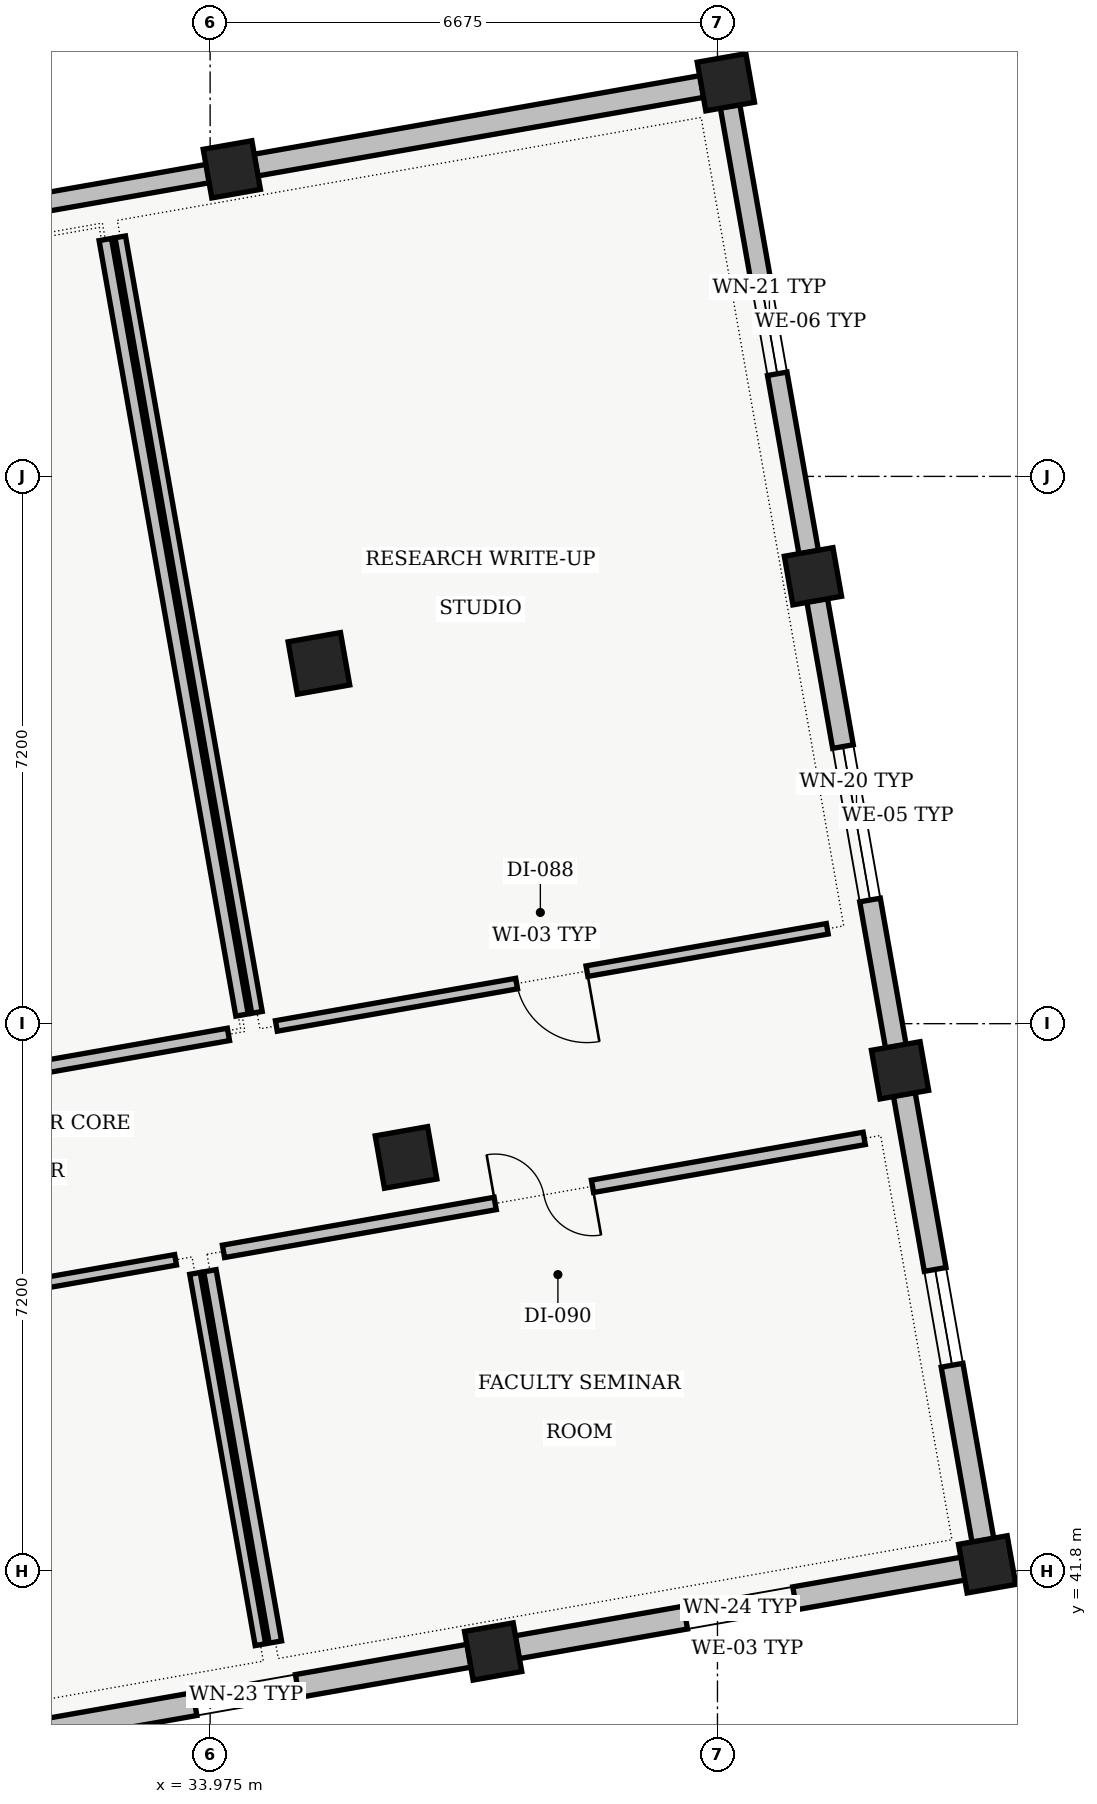
"""IFC4 building model, lengths in metres.
Left out: names, types, materials, properties, quantities, classifications, styles, units other than length and angle.
Written with IfcOpenShell. Run it as: python <this file> out.ifc"""

import sys

from ifc_helpers import new_model, si_unit, direction, frame, frame_2d, origin, origin_2d, place, context, subcontext, project, spatial, rectangle, extrude, element, fill, save


model = new_model("IFC4")
c1 = context("Model", 3, precision=1e-05, world=origin(), true_north=direction((0.0, 1.0)))
c2 = subcontext(c1, "Body", "Model", "MODEL_VIEW")
j1 = project(units=[si_unit("LENGTHUNIT", "METRE"), si_unit("PLANEANGLEUNIT", "RADIAN")], contexts=[c1])
p1 = place(None, origin())
s1 = spatial("IfcSite", under=j1, at=p1, CompositionType="ELEMENT")
p2 = place(p1, origin())
s2 = spatial("IfcBuilding", under=s1, at=p2, CompositionType="ELEMENT")
p3 = place(p2, frame((0.0, 0.0, 9.6)))
s3 = spatial("IfcBuildingStorey", under=s2, at=p3, CompositionType="ELEMENT", Elevation=9.6)
p4 = place(p3, frame((37.699, 40.74, 0.0), z_axis=(0.0, 0.0, 1.0), x_axis=(0.984807753012, 0.173648177667, 0.0)))
e1 = element("IfcColumn", 1, at=p4, inside=s3, PredefinedType="COLUMN", context=c2, shape_type="SweptSolid", body=[
    extrude(rectangle(XDim=0.65, YDim=0.65, at=origin_2d()), origin(), (0.0, 0.0, 1.0), 4.32),
])
for number, where, z_axis, x_axis in (
    (2, (36.552, 47.24, 0.0), (0.0, 0.0, 1.0), (0.985, 0.174, 0.0)),
    (3, (35.406, 53.74, 0.0), (0.0, 0.0, 1.0), (0.985, 0.174, 0.0)),
):
    element("IfcColumn", number, at=place(p3, frame(where, z_axis=z_axis, x_axis=x_axis)), inside=s3, PredefinedType="COLUMN", context=c2, shape_type="SweptSolid", body=[
        extrude(rectangle(XDim=0.7, YDim=0.7, at=origin_2d()), origin(), (0.0, 0.0, 1.0), 4.32),
    ])
for number, where, z_axis, x_axis in (
    (4, (34.26, 60.24, 0.0), (0.0, 0.0, 1.0), (0.985, 0.174, 0.0)),
    (5, (44.198, 41.886, 0.0), (0.0, 0.0, 1.0), (0.985, 0.174, 0.0)),
    (6, (43.052, 48.386, 0.0), (0.0, 0.0, 1.0), (0.985, 0.174, 0.0)),
    (7, (41.906, 54.886, 0.0), (0.0, 0.0, 1.0), (0.985, 0.174, 0.0)),
    (8, (40.76, 61.386, 0.0), (0.0, 0.0, 1.0), (0.985, 0.174, 0.0)),
):
    element("IfcColumn", number, at=place(p3, frame(where, z_axis=z_axis, x_axis=x_axis)), inside=s3, PredefinedType="COLUMN", context=c2, shape_type="SweptSolid", body=[
        extrude(rectangle(XDim=0.65, YDim=0.65, at=origin_2d()), origin(), (0.0, 0.0, 1.0), 4.32),
    ])
p5 = place(p3, frame((28.076, 59.149, 0.0), z_axis=(0.0, 0.0, 1.0), x_axis=(0.98480829201, 0.173645120828, 0.0)))
e9 = element("IfcWall", 9, at=p5, inside=s3, PredefinedType="STANDARD", context=c2, shape_type="SweptSolid", body=[
    extrude(rectangle(XDim=5.96, YDim=0.245, at=frame_2d((2.98, 0.0))), origin(), (0.0, 0.0, 1.0), 3.855),
])
p6 = place(p5, frame((2.34, 0.0, 0.95)))
e10 = element("IfcOpeningElement", 10, at=p6, cuts=e9, PredefinedType="OPENING", context=c2, shape_type="SweptSolid", body=[
    extrude(rectangle(XDim=1.28, YDim=1.4, at=frame_2d((0.64, 0.7))), frame((0.0, 0.123, 0.0), z_axis=(0.0, -1.0, 0.0), x_axis=(1.0, 0.0, 0.0)), (0.0, 0.0, 1.0), 0.245),
])
p7 = place(p3, frame((34.575, 60.295, 0.0), z_axis=(0.0, 0.0, 1.0), x_axis=(0.984809527099, 0.173638116021, 0.0)))
e11 = element("IfcWall", 11, at=p7, inside=s3, PredefinedType="STANDARD", context=c2, shape_type="SweptSolid", body=[
    extrude(rectangle(XDim=5.96, YDim=0.29, at=frame_2d((2.98, 0.0))), origin(), (0.0, 0.0, 1.0), 3.855),
])
p8 = place(p3, frame((40.816, 61.071, 0.0), z_axis=(0.0, 0.0, 1.0), x_axis=(0.173645120828, -0.98480829201, 0.0)))
e12 = element("IfcWall", 12, at=p8, inside=s3, PredefinedType="STANDARD", context=c2, shape_type="SweptSolid", body=[
    extrude(rectangle(XDim=5.96, YDim=0.26, at=frame_2d((2.98, 0.0))), origin(), (0.0, 0.0, 1.0), 3.855),
])
p9 = place(p8, frame((2.385, 0.0, 0.95)))
e13 = element("IfcOpeningElement", 13, at=p9, cuts=e12, PredefinedType="OPENING", context=c2, shape_type="SweptSolid", body=[
    extrude(rectangle(XDim=1.19, YDim=1.38, at=frame_2d((0.595, 0.69))), frame((0.0, 0.13, 0.0), z_axis=(0.0, -1.0, 0.0), x_axis=(1.0, 0.0, 0.0)), (0.0, 0.0, 1.0), 0.26),
])
p10 = place(p3, frame((41.962, 54.571, 0.0), z_axis=(0.0, 0.0, 1.0), x_axis=(0.173645120828, -0.98480829201, 0.0)))
e14 = element("IfcWall", 14, at=p10, inside=s3, PredefinedType="STANDARD", context=c2, shape_type="SweptSolid", body=[
    extrude(rectangle(XDim=5.96, YDim=0.275, at=frame_2d((2.98, 0.0))), origin(), (0.0, 0.0, 1.0), 3.855),
])
p11 = place(p10, frame((1.955, 0.0, 0.95)))
e15 = element("IfcOpeningElement", 15, at=p11, cuts=e14, PredefinedType="OPENING", context=c2, shape_type="SweptSolid", body=[
    extrude(rectangle(XDim=2.05, YDim=1.7, at=frame_2d((1.025, 0.85))), frame((0.0, 0.137, 0.0), z_axis=(0.0, -1.0, 0.0), x_axis=(1.0, 0.0, 0.0)), (0.0, 0.0, 1.0), 0.275),
])
p12 = place(p3, frame((43.108, 48.071, 0.0), z_axis=(0.0, 0.0, 1.0), x_axis=(0.173645120828, -0.98480829201, 0.0)))
e16 = element("IfcWall", 16, at=p12, inside=s3, PredefinedType="STANDARD", context=c2, shape_type="SweptSolid", body=[
    extrude(rectangle(XDim=5.96, YDim=0.29, at=frame_2d((2.98, 0.0))), origin(), (0.0, 0.0, 1.0), 3.855),
])
p13 = place(p12, frame((2.34, 0.0, 0.95)))
e17 = element("IfcOpeningElement", 17, at=p13, cuts=e16, PredefinedType="OPENING", context=c2, shape_type="SweptSolid", body=[
    extrude(rectangle(XDim=1.28, YDim=1.42, at=frame_2d((0.64, 0.71))), frame((0.0, 0.145, 0.0), z_axis=(0.0, -1.0, 0.0), x_axis=(1.0, 0.0, 0.0)), (0.0, 0.0, 1.0), 0.29),
])
p14 = place(p3, frame((43.883, 41.831, 0.0), z_axis=(0.0, 0.0, 1.0), x_axis=(-0.98480829201, -0.173645120828, 0.0)))
e18 = element("IfcWall", 18, at=p14, inside=s3, PredefinedType="STANDARD", context=c2, shape_type="SweptSolid", body=[
    extrude(rectangle(XDim=5.96, YDim=0.305, at=frame_2d((2.98, 0.0))), origin(), (0.0, 0.0, 1.0), 3.855),
])
p15 = place(p14, frame((2.25, 0.0, 0.95)))
e19 = element("IfcOpeningElement", 19, at=p15, cuts=e18, PredefinedType="OPENING", context=c2, shape_type="SweptSolid", body=[
    extrude(rectangle(XDim=1.46, YDim=1.44, at=frame_2d((0.73, 0.72))), frame((0.0, 0.152, 0.0), z_axis=(0.0, -1.0, 0.0), x_axis=(1.0, 0.0, 0.0)), (0.0, 0.0, 1.0), 0.305),
])
p16 = place(p3, frame((37.384, 40.685, 0.0), z_axis=(0.0, 0.0, 1.0), x_axis=(-0.98480829201, -0.173645120828, 0.0)))
e20 = element("IfcWall", 20, at=p16, inside=s3, PredefinedType="STANDARD", context=c2, shape_type="SweptSolid", body=[
    extrude(rectangle(XDim=5.96, YDim=0.305, at=frame_2d((2.98, 0.0))), origin(), (0.0, 0.0, 1.0), 3.855),
])
p17 = place(p16, frame((2.295, 0.0, 0.95)))
e21 = element("IfcOpeningElement", 21, at=p17, cuts=e20, PredefinedType="OPENING", context=c2, shape_type="SweptSolid", body=[
    extrude(rectangle(XDim=1.37, YDim=1.42, at=frame_2d((0.685, 0.71))), frame((0.0, 0.152, 0.0), z_axis=(0.0, -1.0, 0.0), x_axis=(1.0, 0.0, 0.0)), (0.0, 0.0, 1.0), 0.305),
])
p18 = place(p3, frame((20.665, 46.469, 0.0), z_axis=(0.0, 0.0, 1.0), x_axis=(0.984807841198, 0.173647677539, 0.0)))
e22 = element("IfcWall", 22, at=p18, inside=s3, PredefinedType="PARTITIONING", context=c2, shape_type="SweptSolid", body=[
    extrude(rectangle(XDim=13.76, YDim=0.165, at=frame_2d((6.88, 0.0))), origin(), (0.0, 0.0, 1.0), 3.855),
])
p19 = place(p18, frame((6.215, 0.0, 0.0)))
e23 = element("IfcOpeningElement", 23, at=p19, cuts=e22, PredefinedType="OPENING", context=c2, shape_type="SweptSolid", body=[
    extrude(rectangle(XDim=1.33, YDim=2.12, at=frame_2d((0.665, 1.06))), frame((0.0, 0.083, 0.0), z_axis=(0.0, -1.0, 0.0), x_axis=(1.0, 0.0, 0.0)), (0.0, 0.0, 1.0), 0.165),
])
p20 = place(p3, frame((34.395, 49.114, 0.0), z_axis=(0.0, 0.0, 1.0), x_axis=(-0.173654930775, 0.984806562233, 0.0)))
e24 = element("IfcWall", 24, at=p20, inside=s3, PredefinedType="PARTITIONING", context=c2, shape_type="SweptSolid", body=[
    extrude(rectangle(XDim=10.36, YDim=0.165, at=frame_2d((5.18, 0.0))), origin(), (0.0, 0.0, 1.0), 3.95),
])
p21 = place(p3, frame((34.846, 48.97, 0.0), z_axis=(0.0, 0.0, 1.0), x_axis=(0.984813264726, 0.173616916285, 0.0)))
e25 = element("IfcWall", 25, at=p21, inside=s3, PredefinedType="PARTITIONING", context=c2, shape_type="SweptSolid", body=[
    extrude(rectangle(XDim=7.36, YDim=0.14, at=frame_2d((3.68, 0.0))), origin(), (0.0, 0.0, 1.0), 3.855),
])
p22 = place(p21, frame((3.21, 0.0, 0.0)))
e26 = element("IfcOpeningElement", 26, at=p22, cuts=e25, PredefinedType="OPENING", context=c2, shape_type="SweptSolid", body=[
    extrude(rectangle(XDim=0.94, YDim=2.12, at=frame_2d((0.47, 1.06))), frame((0.0, 0.07, 0.0), z_axis=(0.0, -1.0, 0.0), x_axis=(1.0, 0.0, 0.0)), (0.0, 0.0, 1.0), 0.14),
])
p23 = place(p3, frame((32.792, 59.351, 0.0), z_axis=(0.0, 0.0, 1.0), x_axis=(0.173632075677, -0.984810592092, 0.0)))
e27 = element("IfcWall", 27, at=p23, inside=s3, PredefinedType="PARTITIONING", context=c2, shape_type="SweptSolid", body=[
    extrude(rectangle(XDim=10.36, YDim=0.14, at=frame_2d((5.18, 0.0))), origin(), (0.0, 0.0, 1.0), 3.95),
])
p24 = place(p3, frame((34.636, 40.83, 0.0), z_axis=(0.0, 0.0, 1.0), x_axis=(-0.173611232021, 0.984814266812, 0.0)))
e28 = element("IfcWall", 28, at=p24, inside=s3, PredefinedType="PARTITIONING", context=c2, shape_type="SweptSolid", body=[
    extrude(rectangle(XDim=4.96, YDim=0.14, at=frame_2d((2.48, 0.0))), origin(), (0.0, 0.0, 1.0), 3.95),
])
p25 = place(p3, frame((33.521, 45.893, 0.0), z_axis=(0.0, 0.0, 1.0), x_axis=(-0.984809322237, -0.173639277917, 0.0)))
e29 = element("IfcWall", 29, at=p25, inside=s3, PredefinedType="PARTITIONING", context=c2, shape_type="SweptSolid", body=[
    extrude(rectangle(XDim=8.01, YDim=0.14, at=frame_2d((4.005, 0.0))), origin(), (0.0, 0.0, 1.0), 3.95),
])
p26 = place(p25, frame((4.242, 0.0, 0.0)))
e30 = element("IfcOpeningElement", 30, at=p26, cuts=e29, PredefinedType="OPENING", context=c2, shape_type="SweptSolid", body=[
    extrude(rectangle(XDim=0.94, YDim=2.12, at=frame_2d((0.47, 1.06))), frame((0.0, 0.07, 0.0), z_axis=(0.0, -1.0, 0.0), x_axis=(1.0, 0.0, 0.0)), (0.0, 0.0, 1.0), 0.14),
])
p27 = place(p3, frame((42.581, 47.491, 0.0), z_axis=(0.0, 0.0, 1.0), x_axis=(-0.984804798714, -0.173664931489, 0.0)))
e31 = element("IfcWall", 31, at=p27, inside=s3, PredefinedType="PARTITIONING", context=c2, shape_type="SweptSolid", body=[
    extrude(rectangle(XDim=8.56, YDim=0.165, at=frame_2d((4.28, 0.0))), origin(), (0.0, 0.0, 1.0), 3.95),
])
p28 = place(p27, frame((3.63, 0.0, 0.0)))
e32 = element("IfcOpeningElement", 32, at=p28, cuts=e31, PredefinedType="OPENING", context=c2, shape_type="SweptSolid", body=[
    extrude(rectangle(XDim=1.3, YDim=2.18, at=frame_2d((0.65, 1.09))), frame((0.0, 0.083, 0.0), z_axis=(0.0, -1.0, 0.0), x_axis=(1.0, 0.0, 0.0)), (0.0, 0.0, 1.0), 0.165),
])
p29 = place(p3, frame((33.972, 45.75, 0.0), z_axis=(0.0, 0.0, 1.0), x_axis=(0.173650553511, -0.984807334084, 0.0)))
e33 = element("IfcWall", 33, at=p29, inside=s3, PredefinedType="PARTITIONING", context=c2, shape_type="SweptSolid", body=[
    extrude(rectangle(XDim=4.96, YDim=0.165, at=frame_2d((2.48, 0.0))), origin(), (0.0, 0.0, 1.0), 3.95),
])
p30 = place(p9, origin())
e34 = element("IfcWindow", 34, at=p30, inside=s3, PartitioningType="SINGLE_PANEL", PredefinedType="WINDOW", context=c2, shape_type="SweptSolid", body=[
    extrude(rectangle(XDim=1.19, YDim=1.38, at=frame_2d((0.595, 0.69))), frame((0.0, 0.03, 0.0), z_axis=(0.0, -1.0, 0.0), x_axis=(1.0, 0.0, 0.0)), (0.0, 0.0, 1.0), 0.06),
])
fill(e13, e34)
p31 = place(p11, origin())
e35 = element("IfcWindow", 35, at=p31, inside=s3, PartitioningType="SINGLE_PANEL", PredefinedType="WINDOW", context=c2, shape_type="SweptSolid", body=[
    extrude(rectangle(XDim=2.05, YDim=1.7, at=frame_2d((1.025, 0.85))), frame((0.0, 0.03, 0.0), z_axis=(0.0, -1.0, 0.0), x_axis=(1.0, 0.0, 0.0)), (0.0, 0.0, 1.0), 0.06),
])
fill(e15, e35)
p32 = place(p13, origin())
e36 = element("IfcWindow", 36, at=p32, inside=s3, PartitioningType="SINGLE_PANEL", PredefinedType="WINDOW", context=c2, shape_type="SweptSolid", body=[
    extrude(rectangle(XDim=1.28, YDim=1.42, at=frame_2d((0.64, 0.71))), frame((0.0, 0.03, 0.0), z_axis=(0.0, -1.0, 0.0), x_axis=(1.0, 0.0, 0.0)), (0.0, 0.0, 1.0), 0.06),
])
fill(e17, e36)
p33 = place(p15, origin())
e37 = element("IfcWindow", 37, at=p33, inside=s3, PartitioningType="SINGLE_PANEL", PredefinedType="WINDOW", context=c2, shape_type="SweptSolid", body=[
    extrude(rectangle(XDim=1.46, YDim=1.44, at=frame_2d((0.73, 0.72))), frame((0.0, 0.03, 0.0), z_axis=(0.0, -1.0, 0.0), x_axis=(1.0, 0.0, 0.0)), (0.0, 0.0, 1.0), 0.06),
])
fill(e19, e37)
p34 = place(p17, origin())
e38 = element("IfcWindow", 38, at=p34, inside=s3, PartitioningType="SINGLE_PANEL", PredefinedType="WINDOW", context=c2, shape_type="SweptSolid", body=[
    extrude(rectangle(XDim=1.37, YDim=1.42, at=frame_2d((0.685, 0.71))), frame((0.0, 0.03, 0.0), z_axis=(0.0, -1.0, 0.0), x_axis=(1.0, 0.0, 0.0)), (0.0, 0.0, 1.0), 0.06),
])
fill(e21, e38)
p35 = place(p22, origin())
e39 = element("IfcDoor", 39, at=p35, inside=s3, OperationType="SINGLE_SWING_RIGHT", PredefinedType="DOOR", context=c2, shape_type="SweptSolid", body=[
    extrude(rectangle(XDim=0.94, YDim=2.12, at=frame_2d((0.47, 1.06))), frame((0.0, 0.025, 0.0), z_axis=(0.0, -1.0, 0.0), x_axis=(1.0, 0.0, 0.0)), (0.0, 0.0, 1.0), 0.05),
])
fill(e26, e39)
p36 = place(p28, origin())
e40 = element("IfcDoor", 40, at=p36, inside=s3, OperationType="DOUBLE_DOOR_SINGLE_SWING", PredefinedType="DOOR", context=c2, shape_type="SweptSolid", body=[
    extrude(rectangle(XDim=1.3, YDim=2.18, at=frame_2d((0.65, 1.09))), frame((0.0, 0.025, 0.0), z_axis=(0.0, -1.0, 0.0), x_axis=(1.0, 0.0, 0.0)), (0.0, 0.0, 1.0), 0.05),
])
fill(e32, e40)
save(model, sys.argv[1])
